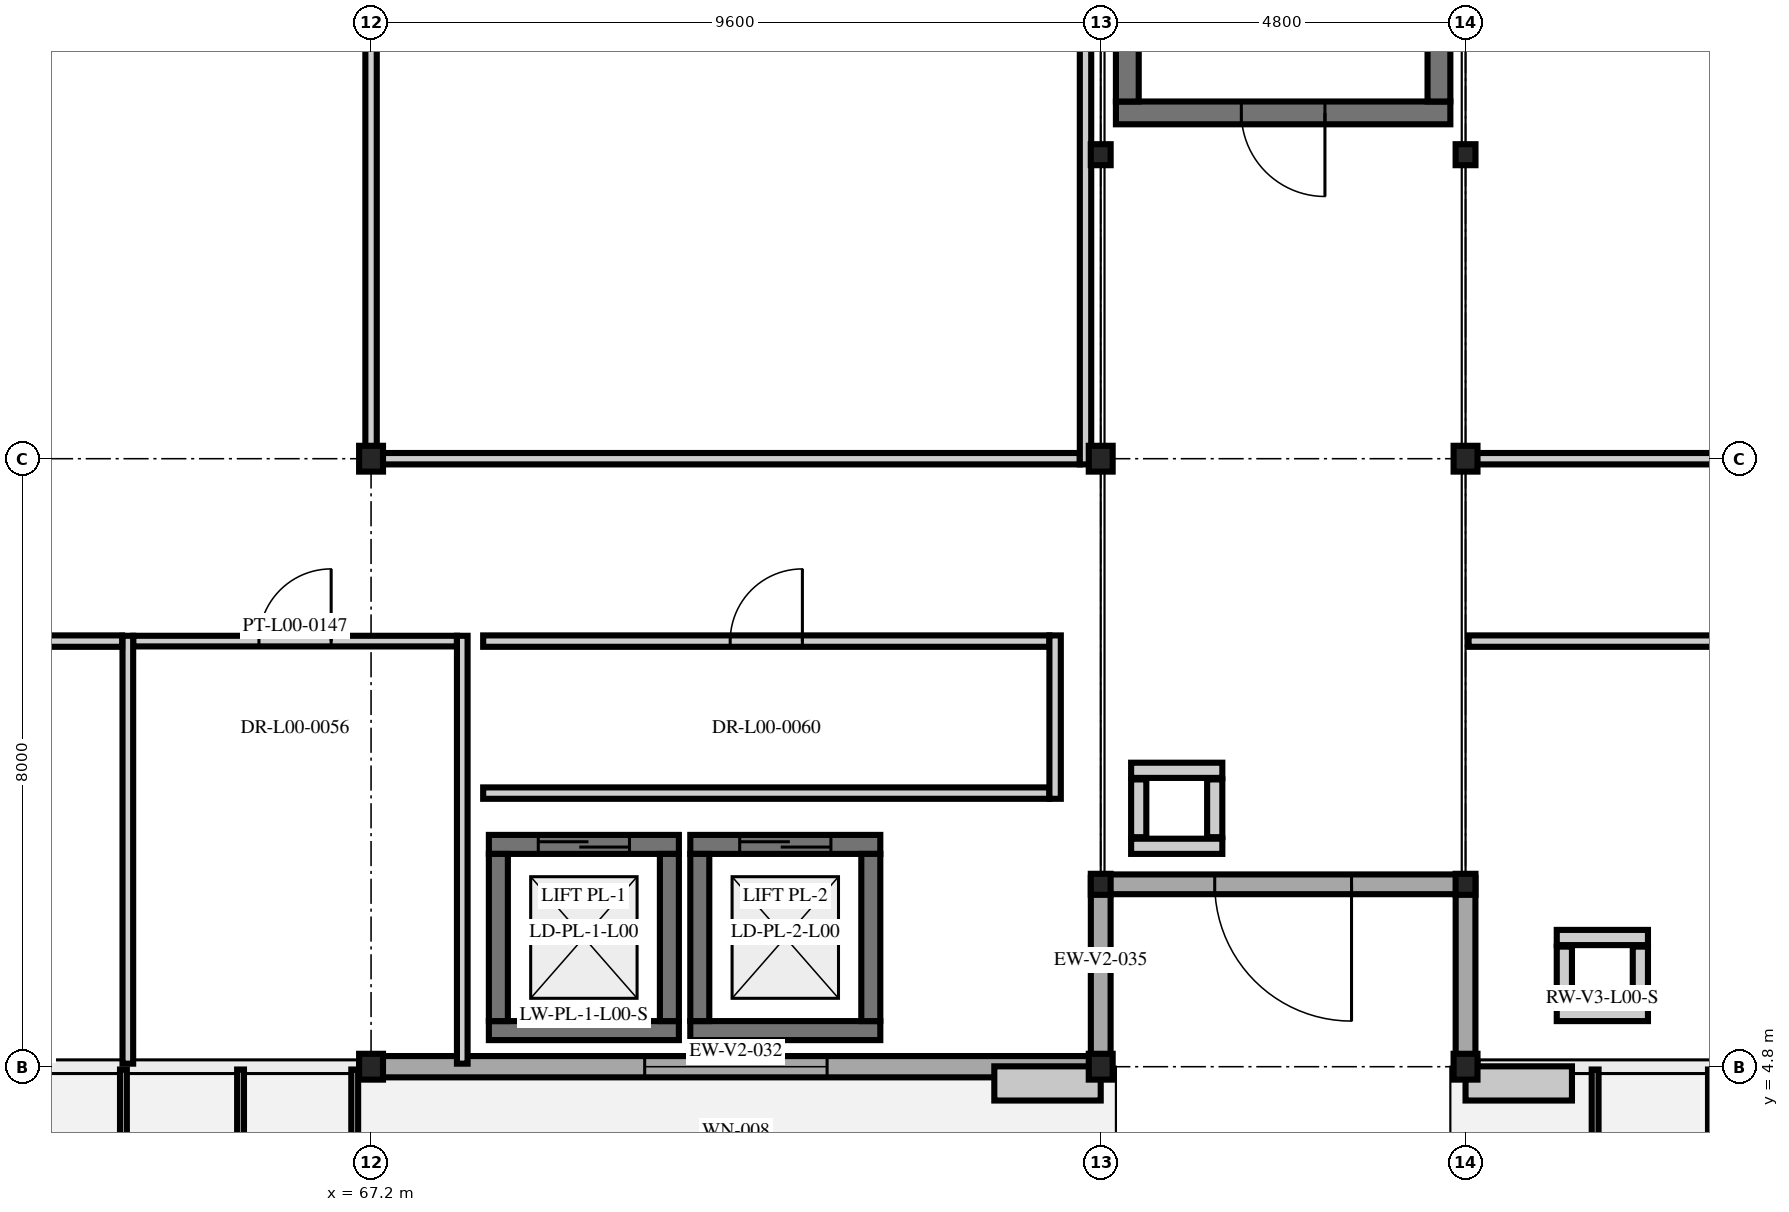
"""IFC4 building model, lengths in metres.
Left out: names, types, materials, properties, quantities, classifications, styles, units other than length and angle.
Written with IfcOpenShell. Run it as: python <this file> out.ifc"""

import sys

from ifc_helpers import new_model, si_unit, direction, frame, frame_2d, origin, origin_2d, place, context, subcontext, project, spatial, rectangle, i_section, extrude, element, fill, save


model = new_model("IFC4")
c1 = context("Model", 3, precision=1e-05, world=origin(), true_north=direction((0.0, 1.0)))
c2 = subcontext(c1, "Body", "Model", "MODEL_VIEW")
j1 = project(units=[si_unit("LENGTHUNIT", "METRE"), si_unit("PLANEANGLEUNIT", "RADIAN")], contexts=[c1])
p1 = place(None, origin())
s1 = spatial("IfcSite", under=j1, at=p1, CompositionType="ELEMENT")
p2 = place(p1, origin())
s2 = spatial("IfcBuilding", under=s1, at=p2, CompositionType="ELEMENT")
p3 = place(p2, origin())
s3 = spatial("IfcBuildingStorey", under=s2, at=p3, CompositionType="ELEMENT", Elevation=0.0)
for number, where, z_axis, x_axis in (
    (1, (67.2, 4.8, 0.0), (0.0, 0.0, 1.0), (1.0, 0.0, 0.0)),
    (2, (67.2, 12.8, 0.0), (0.0, 0.0, 1.0), (1.0, 0.0, 0.0)),
    (3, (76.8, 4.8, 0.0), (0.0, 0.0, 1.0), (1.0, 0.0, 0.0)),
    (4, (76.8, 12.8, 0.0), (0.0, 0.0, 1.0), (1.0, 0.0, 0.0)),
):
    element("IfcColumn", number, at=place(p3, frame(where, z_axis=z_axis, x_axis=x_axis)), inside=s3, PredefinedType="COLUMN", context=c2, shape_type="SweptSolid", body=[
        extrude(i_section(OverallWidth=0.314, OverallDepth=0.34, WebThickness=0.019, FlangeThickness=0.031, at=origin_2d()), origin(), (0.0, 0.0, 1.0), 5.1),
    ])
for number, where, z_axis, x_axis in (
    (5, (76.8, 7.2, 0.0), (0.0, 0.0, 1.0), (1.0, 0.0, 0.0)),
    (6, (76.8, 16.8, 0.0), (0.0, 0.0, 1.0), (1.0, 0.0, 0.0)),
):
    element("IfcColumn", number, at=place(p3, frame(where, z_axis=z_axis, x_axis=x_axis)), inside=s3, PredefinedType="COLUMN", context=c2, shape_type="SweptSolid", body=[
        extrude(i_section(OverallWidth=0.261, OverallDepth=0.276, WebThickness=0.015, FlangeThickness=0.025, at=origin_2d()), origin(), (0.0, 0.0, 1.0), 5.1),
    ])
for number, where, z_axis, x_axis in (
    (7, (81.6, 4.8, 0.0), (0.0, 0.0, 1.0), (1.0, 0.0, 0.0)),
    (8, (81.6, 12.8, 0.0), (0.0, 0.0, 1.0), (1.0, 0.0, 0.0)),
):
    element("IfcColumn", number, at=place(p3, frame(where, z_axis=z_axis, x_axis=x_axis)), inside=s3, PredefinedType="COLUMN", context=c2, shape_type="SweptSolid", body=[
        extrude(i_section(OverallWidth=0.314, OverallDepth=0.34, WebThickness=0.019, FlangeThickness=0.031, at=origin_2d()), origin(), (0.0, 0.0, 1.0), 5.1),
    ])
for number, where, z_axis, x_axis in (
    (9, (81.6, 7.2, 0.0), (0.0, 0.0, 1.0), (1.0, 0.0, 0.0)),
    (10, (81.6, 16.8, 0.0), (0.0, 0.0, 1.0), (1.0, 0.0, 0.0)),
):
    element("IfcColumn", number, at=place(p3, frame(where, z_axis=z_axis, x_axis=x_axis)), inside=s3, PredefinedType="COLUMN", context=c2, shape_type="SweptSolid", body=[
        extrude(i_section(OverallWidth=0.261, OverallDepth=0.276, WebThickness=0.015, FlangeThickness=0.025, at=origin_2d()), origin(), (0.0, 0.0, 1.0), 5.1),
    ])
p4 = place(p3, frame((81.4, 17.35, 0.0), z_axis=(0.0, 0.0, 1.0), x_axis=(-1.0, 0.0, 0.0)))
e11 = element("IfcWall", 11, at=p4, inside=s3, PredefinedType="SHEAR", context=c2, shape_type="SweptSolid", body=[
    extrude(rectangle(XDim=4.4, YDim=0.3, at=frame_2d((2.2, 0.0))), origin(), (0.0, 0.0, 1.0), 4.88),
])
p5 = place(p4, frame((1.65, 0.0, 0.0)))
e12 = element("IfcOpeningElement", 12, at=p5, cuts=e11, PredefinedType="OPENING", context=c2, shape_type="SweptSolid", body=[
    extrude(rectangle(XDim=1.1, YDim=2.2, at=frame_2d((0.55, 1.1))), frame((0.0, 0.16, 0.0), z_axis=(0.0, -1.0, 0.0), x_axis=(1.0, 0.0, 0.0)), (0.0, 0.0, 1.0), 0.32),
])
for number, where, z_axis, x_axis in (
    (13, (77.15, 17.5, 0.0), (0.0, 0.0, 1.0), (0.0, 1.0, 0.0)),
    (14, (81.25, 25.3, 0.0), (0.0, 0.0, 1.0), (0.0, -1.0, 0.0)),
):
    element("IfcWall", number, at=place(p3, frame(where, z_axis=z_axis, x_axis=x_axis)), inside=s3, PredefinedType="SHEAR", context=c2, shape_type="SweptSolid", body=[
        extrude(rectangle(XDim=7.8, YDim=0.3, at=frame_2d((3.9, 0.0))), origin(), (0.0, 0.0, 1.0), 4.88),
    ])
p6 = place(p3, frame((71.25, 5.275, 0.0), z_axis=(0.0, 0.0, 1.0), x_axis=(-1.0, 0.0, 0.0)))
e15 = element("IfcWall", 15, at=p6, inside=s3, PredefinedType="SHEAR", context=c2, shape_type="SweptSolid", body=[
    extrude(rectangle(XDim=2.5, YDim=0.25, at=frame_2d((1.25, 0.0))), origin(), (0.0, 0.0, 1.0), 4.88),
])
p7 = place(p3, frame((68.75, 7.725, 0.0), z_axis=(0.0, 0.0, 1.0), x_axis=(1.0, 0.0, 0.0)))
e16 = element("IfcWall", 16, at=p7, inside=s3, PredefinedType="SHEAR", context=c2, shape_type="SweptSolid", body=[
    extrude(rectangle(XDim=2.5, YDim=0.25, at=frame_2d((1.25, 0.0))), origin(), (0.0, 0.0, 1.0), 4.88),
])
p8 = place(p7, frame((0.65, 0.0, 0.0)))
e17 = element("IfcOpeningElement", 17, at=p8, cuts=e16, PredefinedType="OPENING", context=c2, shape_type="SweptSolid", body=[
    extrude(rectangle(XDim=1.2, YDim=2.2, at=frame_2d((0.6, 1.1))), frame((0.0, 0.135, 0.0), z_axis=(0.0, -1.0, 0.0), x_axis=(1.0, 0.0, 0.0)), (0.0, 0.0, 1.0), 0.27),
])
for number, where, z_axis, x_axis in (
    (18, (68.875, 5.4, 0.0), (0.0, 0.0, 1.0), (0.0, 1.0, 0.0)),
    (19, (71.125, 7.6, 0.0), (0.0, 0.0, 1.0), (0.0, -1.0, 0.0)),
):
    element("IfcWall", number, at=place(p3, frame(where, z_axis=z_axis, x_axis=x_axis)), inside=s3, PredefinedType="SHEAR", context=c2, shape_type="SweptSolid", body=[
        extrude(rectangle(XDim=2.2, YDim=0.25, at=frame_2d((1.1, 0.0))), origin(), (0.0, 0.0, 1.0), 4.88),
    ])
p9 = place(p3, frame((73.9, 5.275, 0.0), z_axis=(0.0, 0.0, 1.0), x_axis=(-1.0, 0.0, 0.0)))
e20 = element("IfcWall", 20, at=p9, inside=s3, PredefinedType="SHEAR", context=c2, shape_type="SweptSolid", body=[
    extrude(rectangle(XDim=2.5, YDim=0.25, at=frame_2d((1.25, 0.0))), origin(), (0.0, 0.0, 1.0), 4.88),
])
p10 = place(p3, frame((71.4, 7.725, 0.0), z_axis=(0.0, 0.0, 1.0), x_axis=(1.0, 0.0, 0.0)))
e21 = element("IfcWall", 21, at=p10, inside=s3, PredefinedType="SHEAR", context=c2, shape_type="SweptSolid", body=[
    extrude(rectangle(XDim=2.5, YDim=0.25, at=frame_2d((1.25, 0.0))), origin(), (0.0, 0.0, 1.0), 4.88),
])
p11 = place(p10, frame((0.65, 0.0, 0.0)))
e22 = element("IfcOpeningElement", 22, at=p11, cuts=e21, PredefinedType="OPENING", context=c2, shape_type="SweptSolid", body=[
    extrude(rectangle(XDim=1.2, YDim=2.2, at=frame_2d((0.6, 1.1))), frame((0.0, 0.135, 0.0), z_axis=(0.0, -1.0, 0.0), x_axis=(1.0, 0.0, 0.0)), (0.0, 0.0, 1.0), 0.27),
])
for number, where, z_axis, x_axis in (
    (23, (71.525, 5.4, 0.0), (0.0, 0.0, 1.0), (0.0, 1.0, 0.0)),
    (24, (73.775, 7.6, 0.0), (0.0, 0.0, 1.0), (0.0, -1.0, 0.0)),
):
    element("IfcWall", number, at=place(p3, frame(where, z_axis=z_axis, x_axis=x_axis)), inside=s3, PredefinedType="SHEAR", context=c2, shape_type="SweptSolid", body=[
        extrude(rectangle(XDim=2.2, YDim=0.25, at=frame_2d((1.1, 0.0))), origin(), (0.0, 0.0, 1.0), 4.88),
    ])
for number, where, z_axis, x_axis in (
    (25, (84.0, 5.5, 0.0), (0.0, 0.0, 1.0), (-1.0, 0.0, 0.0)),
    (26, (82.8, 6.5, 0.0), (0.0, 0.0, 1.0), (1.0, 0.0, 0.0)),
):
    element("IfcWall", number, at=place(p3, frame(where, z_axis=z_axis, x_axis=x_axis)), inside=s3, PredefinedType="PARTITIONING", context=c2, shape_type="SweptSolid", body=[
        extrude(rectangle(XDim=1.2, YDim=0.2, at=frame_2d((0.6, 0.0))), origin(), (0.0, 0.0, 1.0), 4.38),
    ])
for number, where, z_axis, x_axis in (
    (27, (82.9, 5.62, 0.0), (0.0, 0.0, 1.0), (0.0, 1.0, 0.0)),
    (28, (83.9, 6.38, 0.0), (0.0, 0.0, 1.0), (0.0, -1.0, 0.0)),
):
    element("IfcWall", number, at=place(p3, frame(where, z_axis=z_axis, x_axis=x_axis)), inside=s3, PredefinedType="PARTITIONING", context=c2, shape_type="SweptSolid", body=[
        extrude(rectangle(XDim=0.76, YDim=0.2, at=frame_2d((0.38, 0.0))), origin(), (0.0, 0.0, 1.0), 4.38),
    ])
for number, where, z_axis, x_axis in (
    (29, (78.4, 7.7, 0.0), (0.0, 0.0, 1.0), (-1.0, 0.0, 0.0)),
    (30, (77.2, 8.7, 0.0), (0.0, 0.0, 1.0), (1.0, 0.0, 0.0)),
):
    element("IfcWall", number, at=place(p3, frame(where, z_axis=z_axis, x_axis=x_axis)), inside=s3, PredefinedType="PARTITIONING", context=c2, shape_type="SweptSolid", body=[
        extrude(rectangle(XDim=1.2, YDim=0.2, at=frame_2d((0.6, 0.0))), origin(), (0.0, 0.0, 1.0), 4.38),
    ])
for number, where, z_axis, x_axis in (
    (31, (77.3, 7.82, 0.0), (0.0, 0.0, 1.0), (0.0, 1.0, 0.0)),
    (32, (78.3, 8.58, 0.0), (0.0, 0.0, 1.0), (0.0, -1.0, 0.0)),
):
    element("IfcWall", number, at=place(p3, frame(where, z_axis=z_axis, x_axis=x_axis)), inside=s3, PredefinedType="PARTITIONING", context=c2, shape_type="SweptSolid", body=[
        extrude(rectangle(XDim=0.76, YDim=0.2, at=frame_2d((0.38, 0.0))), origin(), (0.0, 0.0, 1.0), 4.38),
    ])
p12 = place(p3, frame((76.885, 4.8, 0.0), z_axis=(0.0, 0.0, 1.0), x_axis=(-1.0, 0.0, 0.0)))
e33 = element("IfcWall", 33, at=p12, inside=s3, PredefinedType="SOLIDWALL", context=c2, shape_type="SweptSolid", body=[
    extrude(rectangle(XDim=9.77, YDim=0.28, at=frame_2d((4.885, 0.0))), origin(), (0.0, 0.0, 1.0), 4.315),
])
p13 = place(p12, frame((3.685, 0.0, 0.95)))
e34 = element("IfcOpeningElement", 34, at=p13, cuts=e33, PredefinedType="OPENING", context=c2, shape_type="SweptSolid", body=[
    extrude(rectangle(XDim=2.4, YDim=2.1, at=frame_2d((1.2, 1.05))), frame((0.0, 0.15, 0.0), z_axis=(0.0, -1.0, 0.0), x_axis=(1.0, 0.0, 0.0)), (0.0, 0.0, 1.0), 0.3),
])
p14 = place(p3, frame((76.8, 7.285, 0.0), z_axis=(0.0, 0.0, 1.0), x_axis=(0.0, -1.0, 0.0)))
e35 = element("IfcWall", 35, at=p14, inside=s3, PredefinedType="SOLIDWALL", context=c2, shape_type="SweptSolid", body=[
    extrude(rectangle(XDim=2.57, YDim=0.26, at=frame_2d((1.285, 0.0))), origin(), (0.0, 0.0, 1.0), 4.315),
])
p15 = place(p3, frame((81.6, 4.715, 0.0), z_axis=(0.0, 0.0, 1.0), x_axis=(0.0, 1.0, 0.0)))
e36 = element("IfcWall", 36, at=p15, inside=s3, PredefinedType="SOLIDWALL", context=c2, shape_type="SweptSolid", body=[
    extrude(rectangle(XDim=2.57, YDim=0.26, at=frame_2d((1.285, 0.0))), origin(), (0.0, 0.0, 1.0), 4.305),
])
p16 = place(p3, frame((81.685, 7.2, 0.0), z_axis=(0.0, 0.0, 1.0), x_axis=(-1.0, 0.0, 0.0)))
e37 = element("IfcWall", 37, at=p16, inside=s3, PredefinedType="SOLIDWALL", context=c2, shape_type="SweptSolid", body=[
    extrude(rectangle(XDim=4.97, YDim=0.26, at=frame_2d((2.485, 0.0))), origin(), (0.0, 0.0, 1.0), 4.388),
])
p17 = place(p16, frame((1.585, 0.0, 0.0)))
e38 = element("IfcOpeningElement", 38, at=p17, cuts=e37, PredefinedType="OPENING", context=c2, shape_type="SweptSolid", body=[
    extrude(rectangle(XDim=1.8, YDim=2.4, at=frame_2d((0.9, 1.2))), frame((0.0, 0.14, 0.0), z_axis=(0.0, -1.0, 0.0), x_axis=(1.0, 0.0, 0.0)), (0.0, 0.0, 1.0), 0.28),
])
p18 = place(p3, frame((64.07, 10.4, 0.0), z_axis=(0.0, 0.0, 1.0), x_axis=(1.0, 0.0, 0.0)))
e39 = element("IfcWall", 39, at=p18, inside=s3, PredefinedType="PARTITIONING", context=c2, shape_type="SweptSolid", body=[
    extrude(rectangle(XDim=4.26, YDim=0.14, at=frame_2d((2.13, 0.0))), origin(), (0.0, 0.0, 1.0), 4.388),
])
p19 = place(p18, frame((1.655, 0.0, 0.0)))
e40 = element("IfcOpeningElement", 40, at=p19, cuts=e39, PredefinedType="OPENING", context=c2, shape_type="SweptSolid", body=[
    extrude(rectangle(XDim=0.95, YDim=2.1, at=frame_2d((0.475, 1.05))), frame((0.0, 0.08, 0.0), z_axis=(0.0, -1.0, 0.0), x_axis=(1.0, 0.0, 0.0)), (0.0, 0.0, 1.0), 0.16),
])
for number, where, z_axis, x_axis in (
    (41, (64.0, 4.84, 0.0), (0.0, 0.0, 1.0), (0.0, 1.0, 0.0)),
    (42, (68.4, 4.84, 0.0), (0.0, 0.0, 1.0), (0.0, 1.0, 0.0)),
):
    element("IfcWall", number, at=place(p3, frame(where, z_axis=z_axis, x_axis=x_axis)), inside=s3, PredefinedType="PARTITIONING", context=c2, shape_type="SweptSolid", body=[
        extrude(rectangle(XDim=5.63, YDim=0.14, at=frame_2d((2.815, 0.0))), origin(), (0.0, 0.0, 1.0), 4.315),
    ])
p20 = place(p3, frame((57.6, 10.4, 0.0), z_axis=(0.0, 0.0, 1.0), x_axis=(1.0, 0.0, 0.0)))
e43 = element("IfcWall", 43, at=p20, inside=s3, PredefinedType="PARTITIONING", context=c2, shape_type="SweptSolid", body=[
    extrude(rectangle(XDim=6.325, YDim=0.15, at=frame_2d((3.163, 0.0))), origin(), (0.0, 0.0, 1.0), 4.388),
])
p21 = place(p20, frame((2.587, 0.0, 0.0)))
e44 = element("IfcOpeningElement", 44, at=p21, cuts=e43, PredefinedType="OPENING", context=c2, shape_type="SweptSolid", body=[
    extrude(rectangle(XDim=1.15, YDim=2.25, at=frame_2d((0.575, 1.125))), frame((0.0, 0.085, 0.0), z_axis=(0.0, -1.0, 0.0), x_axis=(1.0, 0.0, 0.0)), (0.0, 0.0, 1.0), 0.17),
])
p22 = place(p3, frame((68.675, 8.4, 0.0), z_axis=(0.0, 0.0, 1.0), x_axis=(1.0, 0.0, 0.0)))
e45 = element("IfcWall", 45, at=p22, inside=s3, PredefinedType="PARTITIONING", context=c2, shape_type="SweptSolid", body=[
    extrude(rectangle(XDim=7.45, YDim=0.15, at=frame_2d((3.725, 0.0))), origin(), (0.0, 0.0, 1.0), 4.525),
])
p23 = place(p3, frame((68.675, 10.4, 0.0), z_axis=(0.0, 0.0, 1.0), x_axis=(1.0, 0.0, 0.0)))
e46 = element("IfcWall", 46, at=p23, inside=s3, PredefinedType="PARTITIONING", context=c2, shape_type="SweptSolid", body=[
    extrude(rectangle(XDim=7.45, YDim=0.15, at=frame_2d((3.725, 0.0))), origin(), (0.0, 0.0, 1.0), 4.525),
])
p24 = place(p23, frame((3.25, 0.0, 0.0)))
e47 = element("IfcOpeningElement", 47, at=p24, cuts=e46, PredefinedType="OPENING", context=c2, shape_type="SweptSolid", body=[
    extrude(rectangle(XDim=0.95, YDim=2.15, at=frame_2d((0.475, 1.075))), frame((0.0, 0.085, 0.0), z_axis=(0.0, -1.0, 0.0), x_axis=(1.0, 0.0, 0.0)), (0.0, 0.0, 1.0), 0.17),
])
p25 = place(p3, frame((76.2, 8.325, 0.0), z_axis=(0.0, 0.0, 1.0), x_axis=(0.0, 1.0, 0.0)))
e48 = element("IfcWall", 48, at=p25, inside=s3, PredefinedType="PARTITIONING", context=c2, shape_type="SweptSolid", body=[
    extrude(rectangle(XDim=2.15, YDim=0.15, at=frame_2d((1.075, 0.0))), origin(), (0.0, 0.0, 1.0), 4.88),
])
p26 = place(p3, frame((67.275, 12.8, 0.0), z_axis=(0.0, 0.0, 1.0), x_axis=(1.0, 0.0, 0.0)))
e49 = element("IfcWall", 49, at=p26, inside=s3, PredefinedType="PARTITIONING", context=c2, shape_type="SweptSolid", body=[
    extrude(rectangle(XDim=9.25, YDim=0.15, at=frame_2d((4.625, 0.0))), origin(), (0.0, 0.0, 1.0), 4.315),
])
p27 = place(p3, frame((67.2, 12.725, 0.0), z_axis=(0.0, 0.0, 1.0), x_axis=(0.0, 1.0, 0.0)))
e50 = element("IfcWall", 50, at=p27, inside=s3, PredefinedType="PARTITIONING", context=c2, shape_type="SweptSolid", body=[
    extrude(rectangle(XDim=12.95, YDim=0.15, at=frame_2d((6.475, 0.0))), origin(), (0.0, 0.0, 1.0), 4.315),
])
p28 = place(p27, frame((6.0, 0.0, 0.0)))
e51 = element("IfcOpeningElement", 51, at=p28, cuts=e50, PredefinedType="OPENING", context=c2, shape_type="SweptSolid", body=[
    extrude(rectangle(XDim=0.95, YDim=2.15, at=frame_2d((0.475, 1.075))), frame((0.0, 0.085, 0.0), z_axis=(0.0, -1.0, 0.0), x_axis=(1.0, 0.0, 0.0)), (0.0, 0.0, 1.0), 0.17),
])
p29 = place(p3, frame((76.6, 12.725, 0.0), z_axis=(0.0, 0.0, 1.0), x_axis=(0.0, 1.0, 0.0)))
e52 = element("IfcWall", 52, at=p29, inside=s3, PredefinedType="PARTITIONING", context=c2, shape_type="SweptSolid", body=[
    extrude(rectangle(XDim=12.95, YDim=0.15, at=frame_2d((6.475, 0.0))), origin(), (0.0, 0.0, 1.0), 4.315),
])
p30 = place(p3, frame((81.64, 10.4, 0.0), z_axis=(0.0, 0.0, 1.0), x_axis=(1.0, 0.0, 0.0)))
e53 = element("IfcWall", 53, at=p30, inside=s3, PredefinedType="PARTITIONING", context=c2, shape_type="SweptSolid", body=[
    extrude(rectangle(XDim=15.885, YDim=0.15, at=frame_2d((7.942, 0.0))), origin(), (0.0, 0.0, 1.0), 4.405),
])
p31 = place(p30, frame((7.143, 0.0, 0.0)))
e54 = element("IfcOpeningElement", 54, at=p31, cuts=e53, PredefinedType="OPENING", context=c2, shape_type="SweptSolid", body=[
    extrude(rectangle(XDim=1.6, YDim=2.25, at=frame_2d((0.8, 1.125))), frame((0.0, 0.085, 0.0), z_axis=(0.0, -1.0, 0.0), x_axis=(1.0, 0.0, 0.0)), (0.0, 0.0, 1.0), 0.17),
])
p32 = place(p3, frame((81.64, 12.8, 0.0), z_axis=(0.0, 0.0, 1.0), x_axis=(1.0, 0.0, 0.0)))
e55 = element("IfcWall", 55, at=p32, inside=s3, PredefinedType="PARTITIONING", context=c2, shape_type="SweptSolid", body=[
    extrude(rectangle(XDim=12.885, YDim=0.15, at=frame_2d((6.442, 0.0))), origin(), (0.0, 0.0, 1.0), 4.305),
])
p33 = place(p5, origin())
e56 = element("IfcDoor", 56, at=p33, inside=s3, OperationType="SINGLE_SWING_LEFT", PredefinedType="DOOR", context=c2, shape_type="SweptSolid", body=[
    extrude(rectangle(XDim=1.1, YDim=2.2, at=frame_2d((0.55, 1.1))), frame((0.0, 0.025, 0.0), z_axis=(0.0, -1.0, 0.0), x_axis=(1.0, 0.0, 0.0)), (0.0, 0.0, 1.0), 0.05),
])
fill(e12, e56)
p34 = place(p8, origin())
e57 = element("IfcDoor", 57, at=p34, inside=s3, OperationType="DOUBLE_DOOR_SLIDING", PredefinedType="DOOR", context=c2, shape_type="SweptSolid", body=[
    extrude(rectangle(XDim=1.2, YDim=2.2, at=frame_2d((0.6, 1.1))), frame((0.0, 0.025, 0.0), z_axis=(0.0, -1.0, 0.0), x_axis=(1.0, 0.0, 0.0)), (0.0, 0.0, 1.0), 0.05),
])
fill(e17, e57)
p35 = place(p11, origin())
e58 = element("IfcDoor", 58, at=p35, inside=s3, OperationType="DOUBLE_DOOR_SLIDING", PredefinedType="DOOR", context=c2, shape_type="SweptSolid", body=[
    extrude(rectangle(XDim=1.2, YDim=2.2, at=frame_2d((0.6, 1.1))), frame((0.0, 0.025, 0.0), z_axis=(0.0, -1.0, 0.0), x_axis=(1.0, 0.0, 0.0)), (0.0, 0.0, 1.0), 0.05),
])
fill(e22, e58)
p36 = place(p13, origin())
e59 = element("IfcWindow", 59, at=p36, inside=s3, PartitioningType="SINGLE_PANEL", PredefinedType="WINDOW", context=c2, shape_type="SweptSolid", body=[
    extrude(rectangle(XDim=2.4, YDim=2.1, at=frame_2d((1.2, 1.05))), frame((0.0, 0.03, 0.0), z_axis=(0.0, -1.0, 0.0), x_axis=(1.0, 0.0, 0.0)), (0.0, 0.0, 1.0), 0.06),
])
fill(e34, e59)
p37 = place(p17, origin())
e60 = element("IfcDoor", 60, at=p37, inside=s3, OperationType="SINGLE_SWING_LEFT", PredefinedType="DOOR", context=c2, shape_type="SweptSolid", body=[
    extrude(rectangle(XDim=1.8, YDim=2.4, at=frame_2d((0.9, 1.2))), frame((0.0, 0.025, 0.0), z_axis=(0.0, -1.0, 0.0), x_axis=(1.0, 0.0, 0.0)), (0.0, 0.0, 1.0), 0.05),
])
fill(e38, e60)
p38 = place(p19, origin())
e61 = element("IfcDoor", 61, at=p38, inside=s3, OperationType="SINGLE_SWING_RIGHT", PredefinedType="DOOR", context=c2, shape_type="SweptSolid", body=[
    extrude(rectangle(XDim=0.95, YDim=2.1, at=frame_2d((0.475, 1.05))), frame((0.0, 0.025, 0.0), z_axis=(0.0, -1.0, 0.0), x_axis=(1.0, 0.0, 0.0)), (0.0, 0.0, 1.0), 0.05),
])
fill(e40, e61)
p39 = place(p24, origin())
e62 = element("IfcDoor", 62, at=p39, inside=s3, OperationType="SINGLE_SWING_RIGHT", PredefinedType="DOOR", context=c2, shape_type="SweptSolid", body=[
    extrude(rectangle(XDim=0.95, YDim=2.15, at=frame_2d((0.475, 1.075))), frame((0.0, 0.025, 0.0), z_axis=(0.0, -1.0, 0.0), x_axis=(1.0, 0.0, 0.0)), (0.0, 0.0, 1.0), 0.05),
])
fill(e47, e62)
save(model, sys.argv[1])
